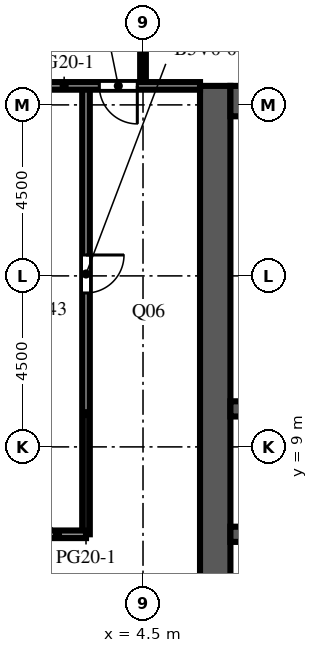
"""IFC4 building model, lengths in metres.
Left out: names, types, materials, properties, quantities, classifications, styles, units other than length and angle.
Written with IfcOpenShell. Run it as: python <this file> out.ifc"""

import sys

from ifc_helpers import new_model, si_unit, direction, frame, frame_2d, origin, place, context, subcontext, project, spatial, rectangle, extrude, element, fill, save


model = new_model("IFC4")
c1 = context("Model", 3, precision=1e-05, world=origin(), true_north=direction((0.0, 1.0)))
c2 = subcontext(c1, "Body", "Model", "MODEL_VIEW")
j1 = project(units=[si_unit("LENGTHUNIT", "METRE"), si_unit("PLANEANGLEUNIT", "RADIAN")], contexts=[c1])
p1 = place(None, origin())
s1 = spatial("IfcSite", under=j1, at=p1, CompositionType="ELEMENT")
p2 = place(p1, origin())
s2 = spatial("IfcBuilding", under=s1, at=p2, CompositionType="ELEMENT")
p3 = place(p2, frame((0.0, 0.0, 160.9)))
s3 = spatial("IfcBuildingStorey", under=s2, at=p3, CompositionType="ELEMENT", Elevation=160.9)
p4 = place(p3, frame((6.4, -9.0, 0.0), z_axis=(0.0, 0.0, 1.0), x_axis=(0.0, 1.0, 0.0)))
e1 = element("IfcWall", 1, at=p4, inside=s3, PredefinedType="SHEAR", context=c2, shape_type="SweptSolid", body=[
    extrude(rectangle(XDim=27.5, YDim=0.8, at=frame_2d((13.75, 0.0))), origin(), (0.0, 0.0, 1.0), 4.1),
])
p5 = place(p4, frame((12.55, 0.0, 0.0)))
e2 = element("IfcOpeningElement", 2, at=p5, cuts=e1, PredefinedType="OPENING", context=c2, shape_type="SweptSolid", body=[
    extrude(rectangle(XDim=2.4, YDim=2.4, at=frame_2d((1.2, 1.2))), frame((0.0, 0.41, 0.0), z_axis=(0.0, -1.0, 0.0), x_axis=(1.0, 0.0, 0.0)), (0.0, 0.0, 1.0), 0.82),
])
p6 = place(p4, frame((5.45, 0.0, 0.0)))
e3 = element("IfcOpeningElement", 3, at=p6, cuts=e1, PredefinedType="OPENING", context=c2, shape_type="SweptSolid", body=[
    extrude(rectangle(XDim=1.2, YDim=2.1, at=frame_2d((0.6, 1.05))), frame((0.0, 0.41, 0.0), z_axis=(0.0, -1.0, 0.0), x_axis=(1.0, 0.0, 0.0)), (0.0, 0.0, 1.0), 0.82),
])
p7 = place(p4, frame((19.45, 0.0, 0.0)))
e4 = element("IfcOpeningElement", 4, at=p7, cuts=e1, PredefinedType="OPENING", context=c2, shape_type="SweptSolid", body=[
    extrude(rectangle(XDim=1.0, YDim=2.1, at=frame_2d((0.5, 1.05))), frame((0.0, 0.41, 0.0), z_axis=(0.0, -1.0, 0.0), x_axis=(1.0, 0.0, 0.0)), (0.0, 0.0, 1.0), 0.82),
])
p8 = place(p4, frame((21.137, 0.0, 0.0)))
e5 = element("IfcOpeningElement", 5, at=p8, cuts=e1, PredefinedType="OPENING", context=c2, shape_type="SweptSolid", body=[
    extrude(rectangle(XDim=1.0, YDim=2.1, at=frame_2d((0.5, 1.05))), frame((0.0, 0.41, 0.0), z_axis=(0.0, -1.0, 0.0), x_axis=(1.0, 0.0, 0.0)), (0.0, 0.0, 1.0), 0.82),
])
p9 = place(p4, frame((23.2, 0.0, 0.0)))
e6 = element("IfcOpeningElement", 6, at=p9, cuts=e1, PredefinedType="OPENING", context=c2, shape_type="SweptSolid", body=[
    extrude(rectangle(XDim=1.0, YDim=2.1, at=frame_2d((0.5, 1.05))), frame((0.0, 0.41, 0.0), z_axis=(0.0, -1.0, 0.0), x_axis=(1.0, 0.0, 0.0)), (0.0, 0.0, 1.0), 0.82),
])
p10 = place(p4, frame((25.262, 0.0, 0.0)))
e7 = element("IfcOpeningElement", 7, at=p10, cuts=e1, PredefinedType="OPENING", context=c2, shape_type="SweptSolid", body=[
    extrude(rectangle(XDim=1.0, YDim=2.1, at=frame_2d((0.5, 1.05))), frame((0.0, 0.41, 0.0), z_axis=(0.0, -1.0, 0.0), x_axis=(1.0, 0.0, 0.0)), (0.0, 0.0, 1.0), 0.82),
])
p11 = place(p3, frame((6.8, 18.1, 0.0), z_axis=(0.0, 0.0, 1.0), x_axis=(1.0, 0.0, 0.0)))
e8 = element("IfcWall", 8, at=p11, inside=s3, PredefinedType="SHEAR", context=c2, shape_type="SweptSolid", body=[
    extrude(rectangle(XDim=10.4, YDim=0.8, at=frame_2d((5.2, 0.0))), origin(), (0.0, 0.0, 1.0), 4.1),
])
p12 = place(p3, frame((6.8, 6.7, 0.0), z_axis=(0.0, 0.0, 1.0), x_axis=(1.0, 0.0, 0.0)))
e9 = element("IfcWall", 9, at=p12, inside=s3, PredefinedType="SHEAR", context=c2, shape_type="SweptSolid", body=[
    extrude(rectangle(XDim=10.4, YDim=0.4, at=frame_2d((5.2, 0.0))), origin(), (0.0, 0.0, 1.0), 4.1),
])
p13 = place(p12, frame((3.337, 0.0, 0.0)))
e10 = element("IfcOpeningElement", 10, at=p13, cuts=e9, PredefinedType="OPENING", context=c2, shape_type="SweptSolid", body=[
    extrude(rectangle(XDim=1.1, YDim=2.1, at=frame_2d((0.55, 1.05))), frame((0.0, 0.21, 0.0), z_axis=(0.0, -1.0, 0.0), x_axis=(1.0, 0.0, 0.0)), (0.0, 0.0, 1.0), 0.42),
])
p14 = place(p12, frame((5.962, 0.0, 0.0)))
e11 = element("IfcOpeningElement", 11, at=p14, cuts=e9, PredefinedType="OPENING", context=c2, shape_type="SweptSolid", body=[
    extrude(rectangle(XDim=1.1, YDim=2.1, at=frame_2d((0.55, 1.05))), frame((0.0, 0.21, 0.0), z_axis=(0.0, -1.0, 0.0), x_axis=(1.0, 0.0, 0.0)), (0.0, 0.0, 1.0), 0.42),
])
p15 = place(p12, frame((8.663, 0.0, 0.0)))
e12 = element("IfcOpeningElement", 12, at=p15, cuts=e9, PredefinedType="OPENING", context=c2, shape_type="SweptSolid", body=[
    extrude(rectangle(XDim=1.1, YDim=2.1, at=frame_2d((0.55, 1.05))), frame((0.0, 0.21, 0.0), z_axis=(0.0, -1.0, 0.0), x_axis=(1.0, 0.0, 0.0)), (0.0, 0.0, 1.0), 0.42),
])
p16 = place(p12, frame((0.688, 0.0, 0.0)))
e13 = element("IfcOpeningElement", 13, at=p16, cuts=e9, PredefinedType="OPENING", context=c2, shape_type="SweptSolid", body=[
    extrude(rectangle(XDim=1.0, YDim=2.1, at=frame_2d((0.5, 1.05))), frame((0.0, 0.21, 0.0), z_axis=(0.0, -1.0, 0.0), x_axis=(1.0, 0.0, 0.0)), (0.0, 0.0, 1.0), 0.42),
])
p17 = place(p3, frame((6.8, 10.0, 0.0), z_axis=(0.0, 0.0, 1.0), x_axis=(1.0, 0.0, 0.0)))
e14 = element("IfcWall", 14, at=p17, inside=s3, PredefinedType="SHEAR", context=c2, shape_type="SweptSolid", body=[
    extrude(rectangle(XDim=10.4, YDim=0.4, at=frame_2d((5.2, 0.0))), origin(), (0.0, 0.0, 1.0), 4.1),
])
for number, where, z_axis, x_axis in (
    (15, (6.8, 11.7, 0.0), (0.0, 0.0, 1.0), (1.0, 0.0, 0.0)),
    (16, (6.8, 13.575, 0.0), (0.0, 0.0, 1.0), (1.0, 0.0, 0.0)),
    (17, (6.8, 15.825, 0.0), (0.0, 0.0, 1.0), (1.0, 0.0, 0.0)),
):
    element("IfcWall", number, at=place(p3, frame(where, z_axis=z_axis, x_axis=x_axis)), inside=s3, PredefinedType="PARTITIONING", context=c2, shape_type="SweptSolid", body=[
        extrude(rectangle(XDim=5.0, YDim=0.1, at=frame_2d((2.5, 0.0))), origin(), (0.0, 0.0, 1.0), 3.65),
    ])
p18 = place(p3, frame((3.0, 6.7, 0.0), z_axis=(0.0, 0.0, 1.0), x_axis=(0.0, 1.0, 0.0)))
e18 = element("IfcWall", 18, at=p18, inside=s3, PredefinedType="PARTITIONING", context=c2, shape_type="SweptSolid", body=[
    extrude(rectangle(XDim=11.8, YDim=0.2, at=frame_2d((5.9, 0.0))), origin(), (0.0, 0.0, 1.0), 3.65),
])
p19 = place(p18, frame((6.35, 0.0, 0.0)))
e19 = element("IfcOpeningElement", 19, at=p19, cuts=e18, PredefinedType="OPENING", context=c2, shape_type="SweptSolid", body=[
    extrude(rectangle(XDim=1.0, YDim=2.1, at=frame_2d((0.5, 1.05))), frame((0.0, 0.11, 0.0), z_axis=(0.0, -1.0, 0.0), x_axis=(1.0, 0.0, 0.0)), (0.0, 0.0, 1.0), 0.22),
])
p20 = place(p3, frame((4.5, 26.5, 0.0), z_axis=(0.0, 0.0, 1.0), x_axis=(0.0, -1.0, 0.0)))
e20 = element("IfcWall", 20, at=p20, inside=s3, PredefinedType="PARTITIONING", context=c2, shape_type="SweptSolid", body=[
    extrude(rectangle(XDim=8.0, YDim=0.15, at=frame_2d((4.0, 0.0))), origin(), (0.0, 0.0, 1.0), 3.65),
])
p21 = place(p20, frame((5.15, 0.0, 0.0)))
e21 = element("IfcOpeningElement", 21, at=p21, cuts=e20, PredefinedType="OPENING", context=c2, shape_type="SweptSolid", body=[
    extrude(rectangle(XDim=1.0, YDim=2.1, at=frame_2d((0.5, 1.05))), frame((0.0, 0.085, 0.0), z_axis=(0.0, -1.0, 0.0), x_axis=(1.0, 0.0, 0.0)), (0.0, 0.0, 1.0), 0.17),
])
p22 = place(p3, frame((1.5, 6.7, 0.0), z_axis=(0.0, 0.0, 1.0), x_axis=(1.0, 0.0, 0.0)))
e22 = element("IfcWall", 22, at=p22, inside=s3, PredefinedType="PARTITIONING", context=c2, shape_type="SweptSolid", body=[
    extrude(rectangle(XDim=1.5, YDim=0.2, at=frame_2d((0.75, 0.0))), origin(), (0.0, 0.0, 1.0), 3.65),
])
p23 = place(p3, frame((1.5, 18.5, 0.0), z_axis=(0.0, 0.0, 1.0), x_axis=(1.0, 0.0, 0.0)))
e23 = element("IfcWall", 23, at=p23, inside=s3, PredefinedType="PARTITIONING", context=c2, shape_type="SweptSolid", body=[
    extrude(rectangle(XDim=4.5, YDim=0.2, at=frame_2d((2.25, 0.0))), origin(), (0.0, 0.0, 1.0), 3.65),
])
p24 = place(p23, frame((1.85, 0.0, 0.0)))
e24 = element("IfcOpeningElement", 24, at=p24, cuts=e23, PredefinedType="OPENING", context=c2, shape_type="SweptSolid", body=[
    extrude(rectangle(XDim=1.0, YDim=2.1, at=frame_2d((0.5, 1.05))), frame((0.0, 0.11, 0.0), z_axis=(0.0, -1.0, 0.0), x_axis=(1.0, 0.0, 0.0)), (0.0, 0.0, 1.0), 0.22),
])
p25 = place(p5, origin())
e25 = element("IfcDoor", 25, at=p25, inside=s3, OperationType="DOUBLE_DOOR_DOUBLE_SWING", PredefinedType="DOOR", context=c2, shape_type="SweptSolid", body=[
    extrude(rectangle(XDim=2.4, YDim=2.4, at=frame_2d((1.2, 1.2))), frame((0.0, 0.025, 0.0), z_axis=(0.0, -1.0, 0.0), x_axis=(1.0, 0.0, 0.0)), (0.0, 0.0, 1.0), 0.05),
])
fill(e2, e25)
p26 = place(p7, origin())
e26 = element("IfcDoor", 26, at=p26, inside=s3, OperationType="SINGLE_SWING_RIGHT", PredefinedType="DOOR", context=c2, shape_type="SweptSolid", body=[
    extrude(rectangle(XDim=1.0, YDim=2.1, at=frame_2d((0.5, 1.05))), frame((0.0, -0.325, 0.0), z_axis=(0.0, -1.0, 0.0), x_axis=(1.0, 0.0, 0.0)), (0.0, 0.0, 1.0), 0.05),
])
fill(e4, e26)
p27 = place(p8, origin())
e27 = element("IfcDoor", 27, at=p27, inside=s3, OperationType="SINGLE_SWING_LEFT", PredefinedType="DOOR", context=c2, shape_type="SweptSolid", body=[
    extrude(rectangle(XDim=1.0, YDim=2.1, at=frame_2d((0.5, 1.05))), frame((0.0, -0.325, 0.0), z_axis=(0.0, -1.0, 0.0), x_axis=(1.0, 0.0, 0.0)), (0.0, 0.0, 1.0), 0.05),
])
fill(e5, e27)
p28 = place(p9, origin())
e28 = element("IfcDoor", 28, at=p28, inside=s3, OperationType="SINGLE_SWING_RIGHT", PredefinedType="DOOR", context=c2, shape_type="SweptSolid", body=[
    extrude(rectangle(XDim=1.0, YDim=2.1, at=frame_2d((0.5, 1.05))), frame((0.0, -0.325, 0.0), z_axis=(0.0, -1.0, 0.0), x_axis=(1.0, 0.0, 0.0)), (0.0, 0.0, 1.0), 0.05),
])
fill(e6, e28)
p29 = place(p10, origin())
e29 = element("IfcDoor", 29, at=p29, inside=s3, OperationType="SINGLE_SWING_LEFT", PredefinedType="DOOR", context=c2, shape_type="SweptSolid", body=[
    extrude(rectangle(XDim=1.0, YDim=2.1, at=frame_2d((0.5, 1.05))), frame((0.0, -0.325, 0.0), z_axis=(0.0, -1.0, 0.0), x_axis=(1.0, 0.0, 0.0)), (0.0, 0.0, 1.0), 0.05),
])
fill(e7, e29)
p30 = place(p19, origin())
e30 = element("IfcDoor", 30, at=p30, inside=s3, OperationType="SINGLE_SWING_RIGHT", PredefinedType="DOOR", context=c2, shape_type="SweptSolid", body=[
    extrude(rectangle(XDim=1.0, YDim=2.1, at=frame_2d((0.5, 1.05))), frame((0.0, 0.025, 0.0), z_axis=(0.0, -1.0, 0.0), x_axis=(1.0, 0.0, 0.0)), (0.0, 0.0, 1.0), 0.05),
])
fill(e19, e30)
p31 = place(p24, origin())
e31 = element("IfcDoor", 31, at=p31, inside=s3, OperationType="SINGLE_SWING_RIGHT", PredefinedType="DOOR", context=c2, shape_type="SweptSolid", body=[
    extrude(rectangle(XDim=1.0, YDim=2.1, at=frame_2d((0.5, 1.05))), frame((0.0, 0.025, 0.0), z_axis=(0.0, -1.0, 0.0), x_axis=(1.0, 0.0, 0.0)), (0.0, 0.0, 1.0), 0.05),
])
fill(e24, e31)
save(model, sys.argv[1])
